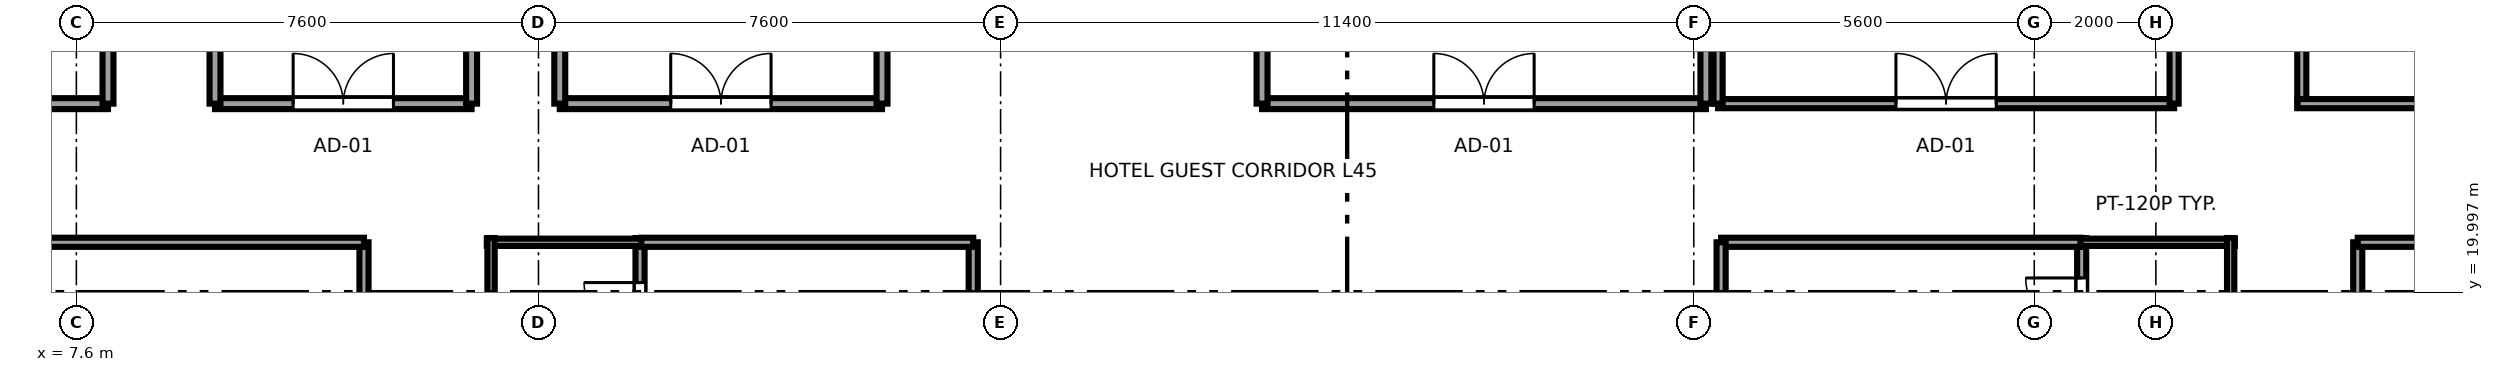
"""IFC4 building model, lengths in metres.
Left out: names, types, materials, properties, quantities, classifications, styles, units other than length and angle.
Written with IfcOpenShell. Run it as: python <this file> out.ifc"""

import sys

from ifc_helpers import new_model, si_unit, direction, frame, frame_2d, origin, place, context, subcontext, project, spatial, rectangle, extrude, source, transform, mapped, element, fill, save


model = new_model("IFC4")
c1 = context("Model", 3, precision=1e-05, world=origin(), true_north=direction((0.0, 1.0)))
c2 = subcontext(c1, "Body", "Model", "MODEL_VIEW")
j1 = project(units=[si_unit("LENGTHUNIT", "METRE"), si_unit("PLANEANGLEUNIT", "RADIAN")], contexts=[c1])
p1 = place(None, origin())
s1 = spatial("IfcSite", under=j1, at=p1, CompositionType="ELEMENT")
p2 = place(p1, origin())
s2 = spatial("IfcBuilding", under=s1, at=p2, CompositionType="ELEMENT")
p3 = place(p2, frame((0.0, 0.0, 171.9)))
s3 = spatial("IfcBuildingStorey", under=s2, at=p3, CompositionType="ELEMENT", Elevation=171.9)
p4 = place(p3, frame((16.87, 18.645, 0.0), z_axis=(0.0, 0.0, 1.0), x_axis=(0.0, 1.0, 0.0)))
e1 = element("IfcWall", 1, at=p4, inside=s3, PredefinedType="PARTITIONING", context=c2, shape_type="SweptSolid", body=[
    extrude(rectangle(XDim=2.245, YDim=0.15, at=frame_2d((1.123, 0.0))), origin(), (0.0, 0.0, 1.0), 3.37),
])
p5 = place(p4, frame((0.593, 0.0, 0.0)))
e2 = element("IfcOpeningElement", 2, at=p5, cuts=e1, PredefinedType="OPENING", context=c2, shape_type="SweptSolid", body=[
    extrude(rectangle(XDim=0.92, YDim=2.01, at=frame_2d((0.46, 1.005))), frame((0.0, 0.085, 0.0), z_axis=(0.0, -1.0, 0.0), x_axis=(1.0, 0.0, 0.0)), (0.0, 0.0, 1.0), 0.17),
])
p6 = place(p3, frame((14.35, 20.82, 0.0), z_axis=(0.0, 0.0, 1.0), x_axis=(1.0, 0.0, 0.0)))
e3 = element("IfcWall", 3, at=p6, inside=s3, PredefinedType="PLUMBINGWALL", context=c2, shape_type="SweptSolid", body=[
    extrude(rectangle(XDim=2.59, YDim=0.12, at=frame_2d((1.295, 0.0))), origin(), (0.0, 0.0, 1.0), 3.37),
])
p7 = place(p3, frame((14.42, 18.645, 0.0), z_axis=(0.0, 0.0, 1.0), x_axis=(0.0, 1.0, 0.0)))
e4 = element("IfcWall", 4, at=p7, inside=s3, PredefinedType="PLUMBINGWALL", context=c2, shape_type="SweptSolid", body=[
    extrude(rectangle(XDim=2.245, YDim=0.12, at=frame_2d((1.123, 0.0))), origin(), (0.0, 0.0, 1.0), 3.37),
])
p8 = place(p3, frame((40.58, 18.797, 0.0), z_axis=(0.0, 0.0, 1.0), x_axis=(0.0, 1.0, 0.0)))
e5 = element("IfcWall", 5, at=p8, inside=s3, PredefinedType="PARTITIONING", context=c2, shape_type="SweptSolid", body=[
    extrude(rectangle(XDim=2.093, YDim=0.15, at=frame_2d((1.046, 0.0))), origin(), (0.0, 0.0, 1.0), 3.37),
])
p9 = place(p8, frame((0.517, 0.0, 0.0)))
e6 = element("IfcOpeningElement", 6, at=p9, cuts=e5, PredefinedType="OPENING", context=c2, shape_type="SweptSolid", body=[
    extrude(rectangle(XDim=0.92, YDim=2.01, at=frame_2d((0.46, 1.005))), frame((0.0, 0.085, 0.0), z_axis=(0.0, -1.0, 0.0), x_axis=(1.0, 0.0, 0.0)), (0.0, 0.0, 1.0), 0.17),
])
p10 = place(p3, frame((40.51, 20.82, 0.0), z_axis=(0.0, 0.0, 1.0), x_axis=(1.0, 0.0, 0.0)))
e7 = element("IfcWall", 7, at=p10, inside=s3, PredefinedType="PLUMBINGWALL", context=c2, shape_type="SweptSolid", body=[
    extrude(rectangle(XDim=2.59, YDim=0.12, at=frame_2d((1.295, 0.0))), origin(), (0.0, 0.0, 1.0), 3.37),
])
p11 = place(p3, frame((43.03, 18.797, 0.0), z_axis=(0.0, 0.0, 1.0), x_axis=(0.0, 1.0, 0.0)))
e8 = element("IfcWall", 8, at=p11, inside=s3, PredefinedType="PLUMBINGWALL", context=c2, shape_type="SweptSolid", body=[
    extrude(rectangle(XDim=2.093, YDim=0.12, at=frame_2d((1.046, 0.0))), origin(), (0.0, 0.0, 1.0), 3.37),
])
p12 = place(p3, frame((12.33, 17.341, 0.0), z_axis=(0.0, 0.0, 1.0), x_axis=(0.0, 1.0, 0.0)))
e9 = element("IfcWall", 9, at=p12, inside=s3, PredefinedType="PARTITIONING", context=c2, shape_type="SweptSolid", body=[
    extrude(rectangle(XDim=3.479, YDim=0.15, at=frame_2d((1.74, 0.0))), origin(), (0.0, 0.0, 1.0), 3.37),
])
p13 = place(p12, frame((1.229, 0.0, 0.0)))
e10 = element("IfcOpeningElement", 10, at=p13, cuts=e9, PredefinedType="OPENING", context=c2, shape_type="SweptSolid", body=[
    extrude(rectangle(XDim=0.98, YDim=2.12, at=frame_2d((0.49, 1.06))), frame((0.0, 0.085, 0.0), z_axis=(0.0, -1.0, 0.0), x_axis=(1.0, 0.0, 0.0)), (0.0, 0.0, 1.0), 0.17),
])
p14 = place(p3, frame((3.005, 20.82, 0.0), z_axis=(0.0, 0.0, 1.0), x_axis=(1.0, 0.0, 0.0)))
e11 = element("IfcWall", 11, at=p14, inside=s3, PredefinedType="PARTITIONING", context=c2, shape_type="SweptSolid", body=[
    extrude(rectangle(XDim=9.325, YDim=0.15, at=frame_2d((4.663, 0.0))), origin(), (0.0, 0.0, 1.0), 3.37),
])
p15 = place(p3, frame((22.35, 15.28, 0.0), z_axis=(0.0, 0.0, 1.0), x_axis=(0.0, 1.0, 0.0)))
e12 = element("IfcWall", 12, at=p15, inside=s3, PredefinedType="PARTITIONING", context=c2, shape_type="SweptSolid", body=[
    extrude(rectangle(XDim=5.54, YDim=0.15, at=frame_2d((2.77, 0.0))), origin(), (0.0, 0.0, 1.0), 3.37),
])
p16 = place(p3, frame((16.89, 20.82, 0.0), z_axis=(0.0, 0.0, 1.0), x_axis=(1.0, 0.0, 0.0)))
e13 = element("IfcWall", 13, at=p16, inside=s3, PredefinedType="PARTITIONING", context=c2, shape_type="SweptSolid", body=[
    extrude(rectangle(XDim=5.46, YDim=0.15, at=frame_2d((2.73, 0.0))), origin(), (0.0, 0.0, 1.0), 3.37),
])
p17 = place(p3, frame((34.65, 20.82, 0.0), z_axis=(0.0, 0.0, 1.0), x_axis=(1.0, 0.0, 0.0)))
e14 = element("IfcWall", 14, at=p17, inside=s3, PredefinedType="PARTITIONING", context=c2, shape_type="SweptSolid", body=[
    extrude(rectangle(XDim=5.91, YDim=0.15, at=frame_2d((2.955, 0.0))), origin(), (0.0, 0.0, 1.0), 3.37),
])
p18 = place(p3, frame((34.65, 15.68, 0.0), z_axis=(0.0, 0.0, 1.0), x_axis=(0.0, 1.0, 0.0)))
e15 = element("IfcWall", 15, at=p18, inside=s3, PredefinedType="PARTITIONING", context=c2, shape_type="SweptSolid", body=[
    extrude(rectangle(XDim=5.14, YDim=0.15, at=frame_2d((2.57, 0.0))), origin(), (0.0, 0.0, 1.0), 3.37),
])
p19 = place(p3, frame((45.12, 17.341, 0.0), z_axis=(0.0, 0.0, 1.0), x_axis=(0.0, 1.0, 0.0)))
e16 = element("IfcWall", 16, at=p19, inside=s3, PredefinedType="PARTITIONING", context=c2, shape_type="SweptSolid", body=[
    extrude(rectangle(XDim=3.479, YDim=0.15, at=frame_2d((1.74, 0.0))), origin(), (0.0, 0.0, 1.0), 3.37),
])
p20 = place(p19, frame((1.229, 0.0, 0.0)))
e17 = element("IfcOpeningElement", 17, at=p20, cuts=e16, PredefinedType="OPENING", context=c2, shape_type="SweptSolid", body=[
    extrude(rectangle(XDim=0.98, YDim=2.12, at=frame_2d((0.49, 1.06))), frame((0.0, 0.085, 0.0), z_axis=(0.0, -1.0, 0.0), x_axis=(1.0, 0.0, 0.0)), (0.0, 0.0, 1.0), 0.17),
])
p21 = place(p3, frame((45.12, 20.82, 0.0), z_axis=(0.0, 0.0, 1.0), x_axis=(1.0, 0.0, 0.0)))
e18 = element("IfcWall", 18, at=p21, inside=s3, PredefinedType="PARTITIONING", context=c2, shape_type="SweptSolid", body=[
    extrude(rectangle(XDim=8.98, YDim=0.15, at=frame_2d((4.49, 0.0))), origin(), (0.0, 0.0, 1.0), 3.37),
])
p22 = place(p3, frame((3.005, 23.1, 0.0), z_axis=(0.0, 0.0, 1.0), x_axis=(1.0, 0.0, 0.0)))
e19 = element("IfcWall", 19, at=p22, inside=s3, PredefinedType="PARTITIONING", context=c2, shape_type="SweptSolid", body=[
    extrude(rectangle(XDim=5.115, YDim=0.18, at=frame_2d((2.558, 0.0))), origin(), (0.0, 0.0, 1.0), 3.37),
])
p23 = place(p3, frame((8.12, 23.1, 0.0), z_axis=(0.0, 0.0, 1.0), x_axis=(0.0, 1.0, 0.0)))
e20 = element("IfcWall", 20, at=p23, inside=s3, PredefinedType="PARTITIONING", context=c2, shape_type="SweptSolid", body=[
    extrude(rectangle(XDim=8.1, YDim=0.18, at=frame_2d((4.05, 0.0))), origin(), (0.0, 0.0, 1.0), 3.37),
])
p24 = place(p23, frame((3.225, 0.0, 0.0)))
e21 = element("IfcOpeningElement", 21, at=p24, cuts=e20, PredefinedType="OPENING", context=c2, shape_type="SweptSolid", body=[
    extrude(rectangle(XDim=1.65, YDim=2.15, at=frame_2d((0.825, 1.075))), frame((0.0, 0.1, 0.0), z_axis=(0.0, -1.0, 0.0), x_axis=(1.0, 0.0, 0.0)), (0.0, 0.0, 1.0), 0.2),
])
p25 = place(p3, frame((44.2, 23.03, 0.0), z_axis=(0.0, 0.0, 1.0), x_axis=(0.0, 1.0, 0.0)))
e22 = element("IfcWall", 22, at=p25, inside=s3, PredefinedType="PARTITIONING", context=c2, shape_type="SweptSolid", body=[
    extrude(rectangle(XDim=3.74, YDim=0.15, at=frame_2d((1.87, 0.0))), origin(), (0.0, 0.0, 1.0), 3.37),
])
p26 = place(p25, frame((1.24, 0.0, 0.0)))
e23 = element("IfcOpeningElement", 23, at=p26, cuts=e22, PredefinedType="OPENING", context=c2, shape_type="SweptSolid", body=[
    extrude(rectangle(XDim=0.92, YDim=2.01, at=frame_2d((0.46, 1.005))), frame((0.0, 0.085, 0.0), z_axis=(0.0, -1.0, 0.0), x_axis=(1.0, 0.0, 0.0)), (0.0, 0.0, 1.0), 0.17),
])
p27 = place(p3, frame((44.13, 23.1, 0.0), z_axis=(0.0, 0.0, 1.0), x_axis=(1.0, 0.0, 0.0)))
e24 = element("IfcWall", 24, at=p27, inside=s3, PredefinedType="PARTITIONING", context=c2, shape_type="SweptSolid", body=[
    extrude(rectangle(XDim=4.54, YDim=0.15, at=frame_2d((2.27, 0.0))), origin(), (0.0, 0.0, 1.0), 3.37),
])
p28 = place(p3, frame((9.88, 23.1, 0.0), z_axis=(0.0, 0.0, 1.0), x_axis=(1.0, 0.0, 0.0)))
e25 = element("IfcWall", 25, at=p28, inside=s3, PredefinedType="PARTITIONING", context=c2, shape_type="SweptSolid", body=[
    extrude(rectangle(XDim=4.22, YDim=0.18, at=frame_2d((2.11, 0.0))), origin(), (0.0, 0.0, 1.0), 3.37),
])
p29 = place(p28, frame((1.285, 0.0, 0.0)))
e26 = element("IfcOpeningElement", 26, at=p29, cuts=e25, PredefinedType="OPENING", context=c2, shape_type="SweptSolid", body=[
    extrude(rectangle(XDim=1.65, YDim=2.15, at=frame_2d((0.825, 1.075))), frame((0.0, 0.1, 0.0), z_axis=(0.0, -1.0, 0.0), x_axis=(1.0, 0.0, 0.0)), (0.0, 0.0, 1.0), 0.2),
])
for number, where, z_axis, x_axis in (
    (27, (9.88, 23.1, 0.0), (0.0, 0.0, 1.0), (0.0, 1.0, 0.0)),
    (28, (14.1, 23.1, 0.0), (0.0, 0.0, 1.0), (0.0, 1.0, 0.0)),
):
    element("IfcWall", number, at=place(p3, frame(where, z_axis=z_axis, x_axis=x_axis)), inside=s3, PredefinedType="PARTITIONING", context=c2, shape_type="SweptSolid", body=[
        extrude(rectangle(XDim=6.65, YDim=0.18, at=frame_2d((3.325, 0.0))), origin(), (0.0, 0.0, 1.0), 3.37),
    ])
p30 = place(p3, frame((27.1, 23.1, 0.0), z_axis=(0.0, 0.0, 1.0), x_axis=(1.0, 0.0, 0.0)))
e29 = element("IfcWall", 29, at=p30, inside=s3, PredefinedType="PARTITIONING", context=c2, shape_type="SweptSolid", body=[
    extrude(rectangle(XDim=7.3, YDim=0.18, at=frame_2d((3.65, 0.0))), origin(), (0.0, 0.0, 1.0), 3.37),
])
p31 = place(p30, frame((2.825, 0.0, 0.0)))
e30 = element("IfcOpeningElement", 30, at=p31, cuts=e29, PredefinedType="OPENING", context=c2, shape_type="SweptSolid", body=[
    extrude(rectangle(XDim=1.65, YDim=2.15, at=frame_2d((0.825, 1.075))), frame((0.0, 0.1, 0.0), z_axis=(0.0, -1.0, 0.0), x_axis=(1.0, 0.0, 0.0)), (0.0, 0.0, 1.0), 0.2),
])
for number, where, z_axis, x_axis in (
    (31, (27.1, 23.1, 0.0), (0.0, 0.0, 1.0), (0.0, 1.0, 0.0)),
    (32, (34.4, 23.1, 0.0), (0.0, 0.0, 1.0), (0.0, 1.0, 0.0)),
):
    element("IfcWall", number, at=place(p3, frame(where, z_axis=z_axis, x_axis=x_axis)), inside=s3, PredefinedType="PARTITIONING", context=c2, shape_type="SweptSolid", body=[
        extrude(rectangle(XDim=6.7, YDim=0.18, at=frame_2d((3.35, 0.0))), origin(), (0.0, 0.0, 1.0), 3.37),
    ])
p32 = place(p3, frame((15.55, 23.1, 0.0), z_axis=(0.0, 0.0, 1.0), x_axis=(1.0, 0.0, 0.0)))
e33 = element("IfcWall", 33, at=p32, inside=s3, PredefinedType="PARTITIONING", context=c2, shape_type="SweptSolid", body=[
    extrude(rectangle(XDim=5.3, YDim=0.18, at=frame_2d((2.65, 0.0))), origin(), (0.0, 0.0, 1.0), 3.37),
])
p33 = place(p32, frame((1.825, 0.0, 0.0)))
e34 = element("IfcOpeningElement", 34, at=p33, cuts=e33, PredefinedType="OPENING", context=c2, shape_type="SweptSolid", body=[
    extrude(rectangle(XDim=1.65, YDim=2.15, at=frame_2d((0.825, 1.075))), frame((0.0, 0.1, 0.0), z_axis=(0.0, -1.0, 0.0), x_axis=(1.0, 0.0, 0.0)), (0.0, 0.0, 1.0), 0.2),
])
for number, where, z_axis, x_axis in (
    (35, (15.55, 23.1, 0.0), (0.0, 0.0, 1.0), (0.0, 1.0, 0.0)),
    (36, (20.85, 23.1, 0.0), (0.0, 0.0, 1.0), (0.0, 1.0, 0.0)),
):
    element("IfcWall", number, at=place(p3, frame(where, z_axis=z_axis, x_axis=x_axis)), inside=s3, PredefinedType="PARTITIONING", context=c2, shape_type="SweptSolid", body=[
        extrude(rectangle(XDim=6.7, YDim=0.18, at=frame_2d((3.35, 0.0))), origin(), (0.0, 0.0, 1.0), 3.37),
    ])
p34 = place(p3, frame((34.6, 23.1, 0.0), z_axis=(0.0, 0.0, 1.0), x_axis=(1.0, 0.0, 0.0)))
e37 = element("IfcWall", 37, at=p34, inside=s3, PredefinedType="PARTITIONING", context=c2, shape_type="SweptSolid", body=[
    extrude(rectangle(XDim=7.5, YDim=0.15, at=frame_2d((3.75, 0.0))), origin(), (0.0, 0.0, 1.0), 3.37),
])
p35 = place(p34, frame((2.925, 0.0, 0.0)))
e38 = element("IfcOpeningElement", 38, at=p35, cuts=e37, PredefinedType="OPENING", context=c2, shape_type="SweptSolid", body=[
    extrude(rectangle(XDim=1.65, YDim=2.15, at=frame_2d((0.825, 1.075))), frame((0.0, 0.085, 0.0), z_axis=(0.0, -1.0, 0.0), x_axis=(1.0, 0.0, 0.0)), (0.0, 0.0, 1.0), 0.17),
])
p36 = place(p3, frame((34.6, 23.1, 0.0), z_axis=(0.0, 0.0, 1.0), x_axis=(0.0, 1.0, 0.0)))
e39 = element("IfcWall", 39, at=p36, inside=s3, PredefinedType="PARTITIONING", context=c2, shape_type="SweptSolid", body=[
    extrude(rectangle(XDim=6.3, YDim=0.15, at=frame_2d((3.15, 0.0))), origin(), (0.0, 0.0, 1.0), 3.37),
])
p37 = place(p3, frame((42.1, 23.1, 0.0), z_axis=(0.0, 0.0, 1.0), x_axis=(0.0, 1.0, 0.0)))
e40 = element("IfcWall", 40, at=p37, inside=s3, PredefinedType="PARTITIONING", context=c2, shape_type="SweptSolid", body=[
    extrude(rectangle(XDim=6.3, YDim=0.15, at=frame_2d((3.15, 0.0))), origin(), (0.0, 0.0, 1.0), 2.16),
])
m1 = source(origin(), c2, "Body", "SweptSolid", [
    extrude(rectangle(XDim=0.92, YDim=2.01, at=frame_2d((0.46, 1.005))), frame((0.0, 0.025, 0.0), z_axis=(0.0, -1.0, 0.0), x_axis=(1.0, 0.0, 0.0)), (0.0, 0.0, 1.0), 0.05),
])
p38 = place(p5, origin())
e41 = element("IfcDoor", 41, at=p38, inside=s3, OperationType="SINGLE_SWING_RIGHT", PredefinedType="DOOR", context=c2, shape_type="MappedRepresentation", body=[
    mapped(m1, transform((0.0, 0.0, 0.0), x_axis=(1.0, 0.0, 0.0), y_axis=(0.0, 1.0, 0.0), z_axis=(0.0, 0.0, 1.0), scale=1.0)),
])
fill(e2, e41)
p39 = place(p9, origin())
e42 = element("IfcDoor", 42, at=p39, inside=s3, OperationType="SINGLE_SWING_RIGHT", PredefinedType="DOOR", context=c2, shape_type="MappedRepresentation", body=[
    mapped(m1, transform((0.0, 0.0, 0.0), x_axis=(1.0, 0.0, 0.0), y_axis=(0.0, 1.0, 0.0), z_axis=(0.0, 0.0, 1.0), scale=1.0)),
])
fill(e6, e42)
m2 = source(origin(), c2, "Body", "SweptSolid", [
    extrude(rectangle(XDim=1.65, YDim=2.15, at=frame_2d((0.825, 1.075))), frame((0.0, 0.025, 0.0), z_axis=(0.0, -1.0, 0.0), x_axis=(1.0, 0.0, 0.0)), (0.0, 0.0, 1.0), 0.05),
])
p40 = place(p29, origin())
e43 = element("IfcDoor", 43, at=p40, inside=s3, OperationType="DOUBLE_DOOR_SINGLE_SWING", PredefinedType="DOOR", context=c2, shape_type="MappedRepresentation", body=[
    mapped(m2, transform((0.0, 0.0, 0.0), x_axis=(1.0, 0.0, 0.0), y_axis=(0.0, 1.0, 0.0), z_axis=(0.0, 0.0, 1.0), scale=1.0)),
])
fill(e26, e43)
p41 = place(p31, origin())
e44 = element("IfcDoor", 44, at=p41, inside=s3, OperationType="DOUBLE_DOOR_SINGLE_SWING", PredefinedType="DOOR", context=c2, shape_type="MappedRepresentation", body=[
    mapped(m2, transform((0.0, 0.0, 0.0), x_axis=(1.0, 0.0, 0.0), y_axis=(0.0, 1.0, 0.0), z_axis=(0.0, 0.0, 1.0), scale=1.0)),
])
fill(e30, e44)
p42 = place(p33, origin())
e45 = element("IfcDoor", 45, at=p42, inside=s3, OperationType="DOUBLE_DOOR_SINGLE_SWING", PredefinedType="DOOR", context=c2, shape_type="MappedRepresentation", body=[
    mapped(m2, transform((0.0, 0.0, 0.0), x_axis=(1.0, 0.0, 0.0), y_axis=(0.0, 1.0, 0.0), z_axis=(0.0, 0.0, 1.0), scale=1.0)),
])
fill(e34, e45)
p43 = place(p35, origin())
e46 = element("IfcDoor", 46, at=p43, inside=s3, OperationType="DOUBLE_DOOR_SINGLE_SWING", PredefinedType="DOOR", context=c2, shape_type="MappedRepresentation", body=[
    mapped(m2, transform((0.0, 0.0, 0.0), x_axis=(1.0, 0.0, 0.0), y_axis=(0.0, 1.0, 0.0), z_axis=(0.0, 0.0, 1.0), scale=1.0)),
])
fill(e38, e46)
save(model, sys.argv[1])
